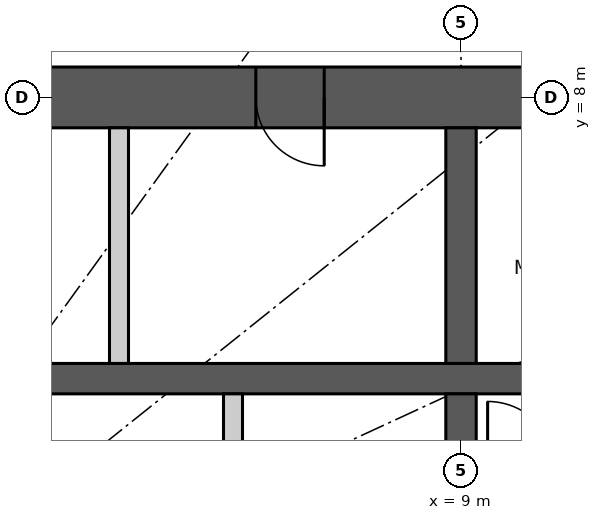
"""IFC4 building model, lengths in metres.
Left out: names, types, materials, properties, quantities, classifications, styles, units other than length and angle.
Written with IfcOpenShell. Run it as: python <this file> out.ifc"""

import sys

from ifc_helpers import new_model, si_unit, direction, frame, frame_2d, origin, place, context, subcontext, project, spatial, rectangle, extrude, element, fill, save


model = new_model("IFC4")
c1 = context("Model", 3, precision=1e-05, world=origin(), true_north=direction((0.0, 1.0)))
c2 = subcontext(c1, "Body", "Model", "MODEL_VIEW")
j1 = project(units=[si_unit("LENGTHUNIT", "METRE"), si_unit("PLANEANGLEUNIT", "RADIAN")], contexts=[c1])
p1 = place(None, origin())
s1 = spatial("IfcSite", under=j1, at=p1, CompositionType="ELEMENT")
p2 = place(p1, origin())
s2 = spatial("IfcBuilding", under=s1, at=p2, CompositionType="ELEMENT")
p3 = place(p2, frame((0.0, 0.0, 156.6)))
s3 = spatial("IfcBuildingStorey", under=s2, at=p3, CompositionType="ELEMENT", Elevation=156.6)
p4 = place(p3, frame((-12.4, 8.0, 0.0), z_axis=(0.0, 0.0, 1.0), x_axis=(1.0, 0.0, 0.0)))
e1 = element("IfcWall", 1, at=p4, inside=s3, PredefinedType="SHEAR", context=c2, shape_type="SweptSolid", body=[
    extrude(rectangle(XDim=24.8, YDim=0.8, at=frame_2d((12.4, 0.0))), origin(), (0.0, 0.0, 1.0), 3.3),
])
p5 = place(p4, frame((11.1, 0.0, 0.0)))
e2 = element("IfcOpeningElement", 2, at=p5, cuts=e1, PredefinedType="OPENING", context=c2, shape_type="SweptSolid", body=[
    extrude(rectangle(XDim=1.2, YDim=2.2, at=frame_2d((0.6, 1.1))), frame((0.0, 0.41, 0.0), z_axis=(0.0, -1.0, 0.0), x_axis=(1.0, 0.0, 0.0)), (0.0, 0.0, 1.0), 0.82),
])
p6 = place(p4, frame((18.7, 0.0, 0.0)))
e3 = element("IfcOpeningElement", 3, at=p6, cuts=e1, PredefinedType="OPENING", context=c2, shape_type="SweptSolid", body=[
    extrude(rectangle(XDim=0.9, YDim=2.2, at=frame_2d((0.45, 1.1))), frame((0.0, 0.41, 0.0), z_axis=(0.0, -1.0, 0.0), x_axis=(1.0, 0.0, 0.0)), (0.0, 0.0, 1.0), 0.82),
])
p7 = place(p3, frame((-11.6, 4.3, 0.0), z_axis=(0.0, 0.0, 1.0), x_axis=(1.0, 0.0, 0.0)))
e4 = element("IfcWall", 4, at=p7, inside=s3, PredefinedType="SHEAR", context=c2, shape_type="SweptSolid", body=[
    extrude(rectangle(XDim=23.2, YDim=0.4, at=frame_2d((11.6, 0.0))), origin(), (0.0, 0.0, 1.0), 3.3),
])
p8 = place(p3, frame((9.0, 4.5, 0.0), z_axis=(0.0, 0.0, 1.0), x_axis=(0.0, 1.0, 0.0)))
e5 = element("IfcWall", 5, at=p8, inside=s3, PredefinedType="SHEAR", context=c2, shape_type="SweptSolid", body=[
    extrude(rectangle(XDim=3.1, YDim=0.4, at=frame_2d((1.55, 0.0))), origin(), (0.0, 0.0, 1.0), 3.3),
])
p9 = place(p3, frame((9.0, 1.75, 0.0), z_axis=(0.0, 0.0, 1.0), x_axis=(0.0, 1.0, 0.0)))
e6 = element("IfcWall", 6, at=p9, inside=s3, PredefinedType="SHEAR", context=c2, shape_type="SweptSolid", body=[
    extrude(rectangle(XDim=2.35, YDim=0.4, at=frame_2d((1.175, 0.0))), origin(), (0.0, 0.0, 1.0), 3.3),
])
p10 = place(p3, frame((4.5, 4.5, 0.0), z_axis=(0.0, 0.0, 1.0), x_axis=(0.0, 1.0, 0.0)))
e7 = element("IfcWall", 7, at=p10, inside=s3, PredefinedType="PARTITIONING", context=c2, shape_type="SweptSolid", body=[
    extrude(rectangle(XDim=3.1, YDim=0.25, at=frame_2d((1.55, 0.0))), origin(), (0.0, 0.0, 1.0), 3.3),
])
p11 = place(p3, frame((6.0, 1.75, 0.0), z_axis=(0.0, 0.0, 1.0), x_axis=(0.0, 1.0, 0.0)))
e8 = element("IfcWall", 8, at=p11, inside=s3, PredefinedType="PARTITIONING", context=c2, shape_type="SweptSolid", body=[
    extrude(rectangle(XDim=2.35, YDim=0.25, at=frame_2d((1.175, 0.0))), origin(), (0.0, 0.0, 1.0), 3.3),
])
p12 = place(p6, origin())
e9 = element("IfcDoor", 9, at=p12, inside=s3, OperationType="SINGLE_SWING_RIGHT", PredefinedType="DOOR", context=c2, shape_type="SweptSolid", body=[
    extrude(rectangle(XDim=0.9, YDim=2.2, at=frame_2d((0.45, 1.1))), frame((0.0, 0.025, 0.0), z_axis=(0.0, -1.0, 0.0), x_axis=(1.0, 0.0, 0.0)), (0.0, 0.0, 1.0), 0.05),
])
fill(e3, e9)
save(model, sys.argv[1])
